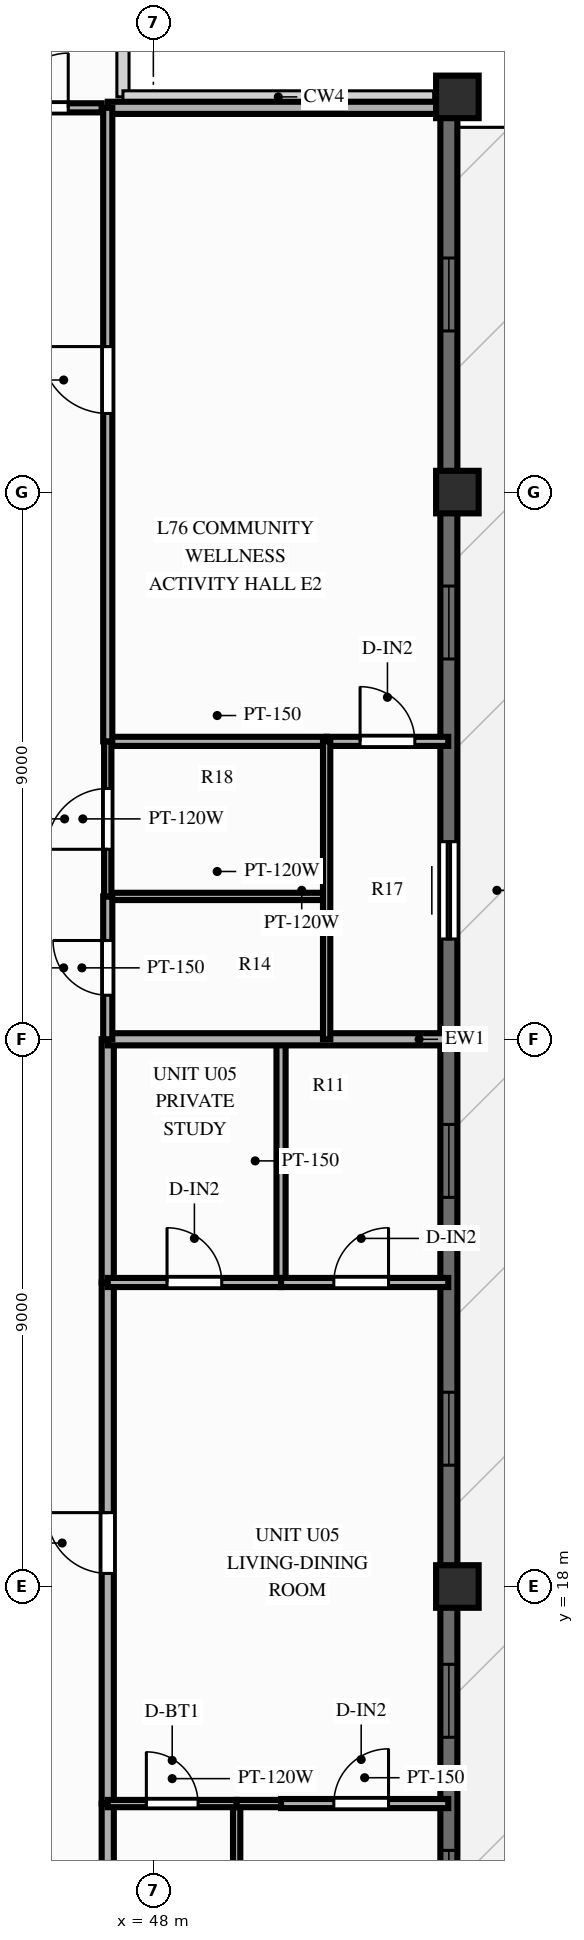
"""IFC4 building model, lengths in metres.
Left out: names, types, materials, properties, quantities, classifications, styles, units other than length and angle.
Written with IfcOpenShell. Run it as: python <this file> out.ifc"""

import sys

from ifc_helpers import new_model, si_unit, direction, frame, frame_2d, origin, origin_2d, place, context, subcontext, project, spatial, rectangle, extrude, source, transform, mapped, element, fill, save


model = new_model("IFC4")
c1 = context("Model", 3, precision=1e-05, world=origin(), true_north=direction((0.0, 1.0)))
c2 = subcontext(c1, "Body", "Model", "MODEL_VIEW")
j1 = project(units=[si_unit("LENGTHUNIT", "METRE"), si_unit("PLANEANGLEUNIT", "RADIAN")], contexts=[c1])
p1 = place(None, origin())
s1 = spatial("IfcSite", under=j1, at=p1, CompositionType="ELEMENT")
p2 = place(p1, origin())
s2 = spatial("IfcBuilding", under=s1, at=p2, CompositionType="ELEMENT")
p3 = place(p2, frame((0.0, 0.0, 246.0)))
s3 = spatial("IfcBuildingStorey", under=s2, at=p3, CompositionType="ELEMENT", Elevation=246.0)
m1 = source(origin(), c2, "Body", "SweptSolid", [
    extrude(rectangle(XDim=0.7, YDim=0.7, at=origin_2d()), origin(), (0.0, 0.0, 1.0), 3.0),
])
for number, where, z_axis, x_axis in (
    (1, (53.0, 18.0, 0.0), (0.0, 0.0, 1.0), (1.0, 0.0, 0.0)),
    (2, (53.0, 36.0, 0.0), (0.0, 0.0, 1.0), (1.0, 0.0, 0.0)),
    (3, (53.0, 42.5, 0.0), (0.0, 0.0, 1.0), (1.0, 0.0, 0.0)),
):
    element("IfcColumn", number, at=place(p3, frame(where, z_axis=z_axis, x_axis=x_axis)), inside=s3, PredefinedType="COLUMN", context=c2, shape_type="MappedRepresentation", body=[
        mapped(m1, transform((0.0, 0.0, 0.0), scale=1.0)),
    ])
p4 = place(p3, frame((52.86, 11.5, 0.0), z_axis=(0.0, 0.0, 1.0), x_axis=(0.0, 1.0, 0.0)))
e4 = element("IfcWall", 4, at=p4, inside=s3, PredefinedType="SOLIDWALL", context=c2, shape_type="SweptSolid", body=[
    extrude(rectangle(XDim=31.0, YDim=0.28, at=frame_2d((15.5, 0.0))), origin(), (0.0, 0.0, 1.0), 2.28),
])
p5 = place(p4, frame((0.96, 0.0, 0.25)))
e5 = element("IfcOpeningElement", 5, at=p5, cuts=e4, PredefinedType="OPENING", context=c2, shape_type="SweptSolid", body=[
    extrude(rectangle(XDim=1.2, YDim=1.5, at=frame_2d((0.6, 0.75))), frame((0.0, 0.152, 0.0), z_axis=(0.0, -1.0, 0.0), x_axis=(1.0, 0.0, 0.0)), (0.0, 0.0, 1.0), 0.304),
])
p6 = place(p4, frame((4.02, 0.0, 0.25)))
e6 = element("IfcOpeningElement", 6, at=p6, cuts=e4, PredefinedType="OPENING", context=c2, shape_type="SweptSolid", body=[
    extrude(rectangle(XDim=1.2, YDim=1.5, at=frame_2d((0.6, 0.75))), frame((0.0, 0.152, 0.0), z_axis=(0.0, -1.0, 0.0), x_axis=(1.0, 0.0, 0.0)), (0.0, 0.0, 1.0), 0.304),
])
p7 = place(p4, frame((8.495, 0.0, 0.25)))
e7 = element("IfcOpeningElement", 7, at=p7, cuts=e4, PredefinedType="OPENING", context=c2, shape_type="SweptSolid", body=[
    extrude(rectangle(XDim=1.2, YDim=1.5, at=frame_2d((0.6, 0.75))), frame((0.0, 0.152, 0.0), z_axis=(0.0, -1.0, 0.0), x_axis=(1.0, 0.0, 0.0)), (0.0, 0.0, 1.0), 0.304),
])
p8 = place(p4, frame((12.9, 0.0, 0.25)))
e8 = element("IfcOpeningElement", 8, at=p8, cuts=e4, PredefinedType="OPENING", context=c2, shape_type="SweptSolid", body=[
    extrude(rectangle(XDim=1.2, YDim=1.5, at=frame_2d((0.6, 0.75))), frame((0.0, 0.152, 0.0), z_axis=(0.0, -1.0, 0.0), x_axis=(1.0, 0.0, 0.0)), (0.0, 0.0, 1.0), 0.304),
])
p9 = place(p4, frame((18.75, 0.0, 0.0), z_axis=(0.0, 0.0, 1.0), x_axis=(-1.0, 0.0, 0.0)))
e9 = element("IfcOpeningElement", 9, at=p9, cuts=e4, PredefinedType="OPENING", context=c2, shape_type="SweptSolid", body=[
    extrude(rectangle(XDim=1.6, YDim=2.15, at=frame_2d((0.8, 1.075))), frame((0.0, 0.152, 0.0), z_axis=(0.0, -1.0, 0.0), x_axis=(1.0, 0.0, 0.0)), (0.0, 0.0, 1.0), 0.304),
])
p10 = place(p4, frame((21.755, 0.0, 0.25)))
e10 = element("IfcOpeningElement", 10, at=p10, cuts=e4, PredefinedType="OPENING", context=c2, shape_type="SweptSolid", body=[
    extrude(rectangle(XDim=1.2, YDim=1.5, at=frame_2d((0.6, 0.75))), frame((0.0, 0.152, 0.0), z_axis=(0.0, -1.0, 0.0), x_axis=(1.0, 0.0, 0.0)), (0.0, 0.0, 1.0), 0.304),
])
p11 = place(p4, frame((27.15, 0.0, 0.25)))
e11 = element("IfcOpeningElement", 11, at=p11, cuts=e4, PredefinedType="OPENING", context=c2, shape_type="SweptSolid", body=[
    extrude(rectangle(XDim=1.2, YDim=1.5, at=frame_2d((0.6, 0.75))), frame((0.0, 0.152, 0.0), z_axis=(0.0, -1.0, 0.0), x_axis=(1.0, 0.0, 0.0)), (0.0, 0.0, 1.0), 0.304),
])
p12 = place(p3, frame((44.82, 42.32, 0.0), z_axis=(0.0, 0.0, 1.0), x_axis=(1.0, 0.0, 0.0)))
e12 = element("IfcWall", 12, at=p12, inside=s3, PredefinedType="PARTITIONING", context=c2, shape_type="SweptSolid", body=[
    extrude(rectangle(XDim=2.33, YDim=0.15, at=frame_2d((1.165, 0.0))), origin(), (0.0, 0.0, 1.0), 2.74),
])
p13 = place(p12, frame((0.88, 0.0, 0.0)))
e13 = element("IfcOpeningElement", 13, at=p13, cuts=e12, PredefinedType="OPENING", context=c2, shape_type="SweptSolid", body=[
    extrude(rectangle(XDim=0.9, YDim=2.1, at=frame_2d((0.45, 1.05))), frame((0.0, 0.087, 0.0), z_axis=(0.0, -1.0, 0.0), x_axis=(1.0, 0.0, 0.0)), (0.0, 0.0, 1.0), 0.174),
])
p14 = place(p3, frame((47.25, 42.32, 0.0), z_axis=(0.0, 0.0, 1.0), x_axis=(1.0, 0.0, 0.0)))
e14 = element("IfcWall", 14, at=p14, inside=s3, PredefinedType="PARTITIONING", context=c2, shape_type="SweptSolid", body=[
    extrude(rectangle(XDim=5.6, YDim=0.2, at=frame_2d((2.8, 0.0))), origin(), (0.0, 0.0, 1.0), 2.74),
])
p15 = place(p3, frame((47.25, 11.68, 0.0), z_axis=(0.0, 0.0, 1.0), x_axis=(0.0, 1.0, 0.0)))
e15 = element("IfcWall", 15, at=p15, inside=s3, PredefinedType="PARTITIONING", context=c2, shape_type="SweptSolid", body=[
    extrude(rectangle(XDim=2.75, YDim=0.2, at=frame_2d((1.375, 0.0))), origin(), (0.0, 0.0, 1.0), 2.74),
])
p16 = place(p3, frame((47.25, 14.43, 0.0), z_axis=(0.0, 0.0, 1.0), x_axis=(0.0, 1.0, 0.0)))
e16 = element("IfcWall", 16, at=p16, inside=s3, PredefinedType="PARTITIONING", context=c2, shape_type="SweptSolid", body=[
    extrude(rectangle(XDim=8.57, YDim=0.2, at=frame_2d((4.285, 0.0))), origin(), (0.0, 0.0, 1.0), 2.74),
])
p17 = place(p16, frame((3.785, 0.0, 0.0)))
e17 = element("IfcOpeningElement", 17, at=p17, cuts=e16, PredefinedType="OPENING", context=c2, shape_type="SweptSolid", body=[
    extrude(rectangle(XDim=1.0, YDim=2.15, at=frame_2d((0.5, 1.075))), frame((0.0, 0.112, 0.0), z_axis=(0.0, -1.0, 0.0), x_axis=(1.0, 0.0, 0.0)), (0.0, 0.0, 1.0), 0.224),
])
p18 = place(p3, frame((47.25, 23.0, 0.0), z_axis=(0.0, 0.0, 1.0), x_axis=(0.0, 1.0, 0.0)))
e18 = element("IfcWall", 18, at=p18, inside=s3, PredefinedType="PARTITIONING", context=c2, shape_type="SweptSolid", body=[
    extrude(rectangle(XDim=4.0, YDim=0.2, at=frame_2d((2.0, 0.0))), origin(), (0.0, 0.0, 1.0), 2.74),
])
p19 = place(p3, frame((49.37, 11.68, 0.0), z_axis=(0.0, 0.0, 1.0), x_axis=(0.0, 1.0, 0.0)))
e19 = element("IfcWall", 19, at=p19, inside=s3, PredefinedType="PARTITIONING", context=c2, shape_type="SweptSolid", body=[
    extrude(rectangle(XDim=2.75, YDim=0.12, at=frame_2d((1.375, 0.0))), origin(), (0.0, 0.0, 1.0), 2.74),
])
p20 = place(p3, frame((50.1, 23.0, 0.0), z_axis=(0.0, 0.0, 1.0), x_axis=(0.0, 1.0, 0.0)))
e20 = element("IfcWall", 20, at=p20, inside=s3, PredefinedType="PARTITIONING", context=c2, shape_type="SweptSolid", body=[
    extrude(rectangle(XDim=4.0, YDim=0.15, at=frame_2d((2.0, 0.0))), origin(), (0.0, 0.0, 1.0), 2.74),
])
p21 = place(p3, frame((47.25, 14.43, 0.0), z_axis=(0.0, 0.0, 1.0), x_axis=(1.0, 0.0, 0.0)))
e21 = element("IfcWall", 21, at=p21, inside=s3, PredefinedType="PARTITIONING", context=c2, shape_type="SweptSolid", body=[
    extrude(rectangle(XDim=2.12, YDim=0.12, at=frame_2d((1.06, 0.0))), origin(), (0.0, 0.0, 1.0), 2.74),
])
p22 = place(p21, frame((0.635, 0.0, 0.0)))
e22 = element("IfcOpeningElement", 22, at=p22, cuts=e21, PredefinedType="OPENING", context=c2, shape_type="SweptSolid", body=[
    extrude(rectangle(XDim=0.85, YDim=2.05, at=frame_2d((0.425, 1.025))), frame((0.0, 0.072, 0.0), z_axis=(0.0, -1.0, 0.0), x_axis=(1.0, 0.0, 0.0)), (0.0, 0.0, 1.0), 0.144),
])
p23 = place(p3, frame((49.37, 14.43, 0.0), z_axis=(0.0, 0.0, 1.0), x_axis=(1.0, 0.0, 0.0)))
e23 = element("IfcWall", 23, at=p23, inside=s3, PredefinedType="PARTITIONING", context=c2, shape_type="SweptSolid", body=[
    extrude(rectangle(XDim=0.73, YDim=0.12, at=frame_2d((0.365, 0.0))), origin(), (0.0, 0.0, 1.0), 2.74),
])
p24 = place(p3, frame((50.1, 14.43, 0.0), z_axis=(0.0, 0.0, 1.0), x_axis=(1.0, 0.0, 0.0)))
e24 = element("IfcWall", 24, at=p24, inside=s3, PredefinedType="PARTITIONING", context=c2, shape_type="SweptSolid", body=[
    extrude(rectangle(XDim=2.75, YDim=0.15, at=frame_2d((1.375, 0.0))), origin(), (0.0, 0.0, 1.0), 2.74),
])
p25 = place(p24, frame((0.868, 0.0, 0.0)))
e25 = element("IfcOpeningElement", 25, at=p25, cuts=e24, PredefinedType="OPENING", context=c2, shape_type="SweptSolid", body=[
    extrude(rectangle(XDim=0.9, YDim=2.1, at=frame_2d((0.45, 1.05))), frame((0.0, 0.087, 0.0), z_axis=(0.0, -1.0, 0.0), x_axis=(1.0, 0.0, 0.0)), (0.0, 0.0, 1.0), 0.174),
])
p26 = place(p3, frame((47.25, 23.0, 0.0), z_axis=(0.0, 0.0, 1.0), x_axis=(1.0, 0.0, 0.0)))
e26 = element("IfcWall", 26, at=p26, inside=s3, PredefinedType="PARTITIONING", context=c2, shape_type="SweptSolid", body=[
    extrude(rectangle(XDim=2.85, YDim=0.15, at=frame_2d((1.425, 0.0))), origin(), (0.0, 0.0, 1.0), 2.74),
])
p27 = place(p26, frame((0.975, 0.0, 0.0)))
e27 = element("IfcOpeningElement", 27, at=p27, cuts=e26, PredefinedType="OPENING", context=c2, shape_type="SweptSolid", body=[
    extrude(rectangle(XDim=0.9, YDim=2.1, at=frame_2d((0.45, 1.05))), frame((0.0, 0.087, 0.0), z_axis=(0.0, -1.0, 0.0), x_axis=(1.0, 0.0, 0.0)), (0.0, 0.0, 1.0), 0.174),
])
p28 = place(p3, frame((50.1, 23.0, 0.0), z_axis=(0.0, 0.0, 1.0), x_axis=(1.0, 0.0, 0.0)))
e28 = element("IfcWall", 28, at=p28, inside=s3, PredefinedType="PARTITIONING", context=c2, shape_type="SweptSolid", body=[
    extrude(rectangle(XDim=2.75, YDim=0.15, at=frame_2d((1.375, 0.0))), origin(), (0.0, 0.0, 1.0), 2.74),
])
p29 = place(p28, frame((0.868, 0.0, 0.0)))
e29 = element("IfcOpeningElement", 29, at=p29, cuts=e28, PredefinedType="OPENING", context=c2, shape_type="SweptSolid", body=[
    extrude(rectangle(XDim=0.9, YDim=2.1, at=frame_2d((0.45, 1.05))), frame((0.0, 0.087, 0.0), z_axis=(0.0, -1.0, 0.0), x_axis=(1.0, 0.0, 0.0)), (0.0, 0.0, 1.0), 0.174),
])
p30 = place(p3, frame((47.25, 27.0, 0.0), z_axis=(0.0, 0.0, 1.0), x_axis=(1.0, 0.0, 0.0)))
e30 = element("IfcWall", 30, at=p30, inside=s3, PredefinedType="PARTITIONING", context=c2, shape_type="SweptSolid", body=[
    extrude(rectangle(XDim=5.6, YDim=0.2, at=frame_2d((2.8, 0.0))), origin(), (0.0, 0.0, 1.0), 2.74),
])
p31 = place(p3, frame((47.25, 29.35, 0.0), z_axis=(0.0, 0.0, 1.0), x_axis=(1.0, 0.0, 0.0)))
e31 = element("IfcWall", 31, at=p31, inside=s3, PredefinedType="PARTITIONING", context=c2, shape_type="SweptSolid", body=[
    extrude(rectangle(XDim=3.6, YDim=0.12, at=frame_2d((1.8, 0.0))), origin(), (0.0, 0.0, 1.0), 2.74),
])
p32 = place(p3, frame((47.25, 31.9, 0.0), z_axis=(0.0, 0.0, 1.0), x_axis=(1.0, 0.0, 0.0)))
e32 = element("IfcWall", 32, at=p32, inside=s3, PredefinedType="PARTITIONING", context=c2, shape_type="SweptSolid", body=[
    extrude(rectangle(XDim=3.6, YDim=0.15, at=frame_2d((1.8, 0.0))), origin(), (0.0, 0.0, 1.0), 2.39),
])
p33 = place(p3, frame((50.85, 31.9, 0.0), z_axis=(0.0, 0.0, 1.0), x_axis=(1.0, 0.0, 0.0)))
e33 = element("IfcWall", 33, at=p33, inside=s3, PredefinedType="PARTITIONING", context=c2, shape_type="SweptSolid", body=[
    extrude(rectangle(XDim=2.0, YDim=0.15, at=frame_2d((1.0, 0.0))), origin(), (0.0, 0.0, 1.0), 2.39),
])
p34 = place(p33, frame((0.55, 0.0, 0.0)))
e34 = element("IfcOpeningElement", 34, at=p34, cuts=e33, PredefinedType="OPENING", context=c2, shape_type="SweptSolid", body=[
    extrude(rectangle(XDim=0.9, YDim=2.1, at=frame_2d((0.45, 1.05))), frame((0.0, 0.087, 0.0), z_axis=(0.0, -1.0, 0.0), x_axis=(1.0, 0.0, 0.0)), (0.0, 0.0, 1.0), 0.174),
])
p35 = place(p3, frame((50.85, 27.0, 0.0), z_axis=(0.0, 0.0, 1.0), x_axis=(0.0, 1.0, 0.0)))
e35 = element("IfcWall", 35, at=p35, inside=s3, PredefinedType="PARTITIONING", context=c2, shape_type="SweptSolid", body=[
    extrude(rectangle(XDim=4.9, YDim=0.12, at=frame_2d((2.45, 0.0))), origin(), (0.0, 0.0, 1.0), 2.74),
])
p36 = place(p3, frame((47.25, 27.0, 0.0), z_axis=(0.0, 0.0, 1.0), x_axis=(0.0, 1.0, 0.0)))
e36 = element("IfcWall", 36, at=p36, inside=s3, PredefinedType="PARTITIONING", context=c2, shape_type="SweptSolid", body=[
    extrude(rectangle(XDim=2.35, YDim=0.15, at=frame_2d((1.175, 0.0))), origin(), (0.0, 0.0, 1.0), 2.74),
])
p37 = place(p36, frame((0.725, 0.0, 0.0)))
e37 = element("IfcOpeningElement", 37, at=p37, cuts=e36, PredefinedType="OPENING", context=c2, shape_type="SweptSolid", body=[
    extrude(rectangle(XDim=0.9, YDim=2.1, at=frame_2d((0.45, 1.05))), frame((0.0, 0.087, 0.0), z_axis=(0.0, -1.0, 0.0), x_axis=(1.0, 0.0, 0.0)), (0.0, 0.0, 1.0), 0.174),
])
p38 = place(p3, frame((47.25, 29.35, 0.0), z_axis=(0.0, 0.0, 1.0), x_axis=(0.0, 1.0, 0.0)))
e38 = element("IfcWall", 38, at=p38, inside=s3, PredefinedType="PARTITIONING", context=c2, shape_type="SweptSolid", body=[
    extrude(rectangle(XDim=2.55, YDim=0.12, at=frame_2d((1.275, 0.0))), origin(), (0.0, 0.0, 1.0), 2.74),
])
p39 = place(p38, frame((0.775, 0.0, 0.0)))
e39 = element("IfcOpeningElement", 39, at=p39, cuts=e38, PredefinedType="OPENING", context=c2, shape_type="SweptSolid", body=[
    extrude(rectangle(XDim=1.0, YDim=2.1, at=frame_2d((0.5, 1.05))), frame((0.0, 0.072, 0.0), z_axis=(0.0, -1.0, 0.0), x_axis=(1.0, 0.0, 0.0)), (0.0, 0.0, 1.0), 0.144),
])
p40 = place(p3, frame((47.25, 31.9, 0.0), z_axis=(0.0, 0.0, 1.0), x_axis=(0.0, 1.0, 0.0)))
e40 = element("IfcWall", 40, at=p40, inside=s3, PredefinedType="PARTITIONING", context=c2, shape_type="SweptSolid", body=[
    extrude(rectangle(XDim=10.42, YDim=0.15, at=frame_2d((5.21, 0.0))), origin(), (0.0, 0.0, 1.0), 2.74),
])
p41 = place(p40, frame((5.393, 0.0, 0.0)))
e41 = element("IfcOpeningElement", 41, at=p41, cuts=e40, PredefinedType="OPENING", context=c2, shape_type="SweptSolid", body=[
    extrude(rectangle(XDim=1.1, YDim=2.15, at=frame_2d((0.55, 1.075))), frame((0.0, 0.087, 0.0), z_axis=(0.0, -1.0, 0.0), x_axis=(1.0, 0.0, 0.0)), (0.0, 0.0, 1.0), 0.174),
])
m2 = source(origin(), c2, "Body", "SweptSolid", [
    extrude(rectangle(XDim=1.2, YDim=1.5, at=frame_2d((0.6, 0.75))), frame((0.0, 0.03, 0.0), z_axis=(0.0, -1.0, 0.0), x_axis=(1.0, 0.0, 0.0)), (0.0, 0.0, 1.0), 0.06),
])
p42 = place(p5, origin())
e42 = element("IfcWindow", 42, at=p42, inside=s3, PartitioningType="SINGLE_PANEL", PredefinedType="WINDOW", context=c2, shape_type="MappedRepresentation", body=[
    mapped(m2, transform((0.0, 0.0, 0.0), scale=1.0)),
])
fill(e5, e42)
p43 = place(p6, origin())
e43 = element("IfcWindow", 43, at=p43, inside=s3, PartitioningType="SINGLE_PANEL", PredefinedType="WINDOW", context=c2, shape_type="MappedRepresentation", body=[
    mapped(m2, transform((0.0, 0.0, 0.0), scale=1.0)),
])
fill(e6, e43)
p44 = place(p7, origin())
e44 = element("IfcWindow", 44, at=p44, inside=s3, PartitioningType="SINGLE_PANEL", PredefinedType="WINDOW", context=c2, shape_type="MappedRepresentation", body=[
    mapped(m2, transform((0.0, 0.0, 0.0), scale=1.0)),
])
fill(e7, e44)
p45 = place(p8, origin())
e45 = element("IfcWindow", 45, at=p45, inside=s3, PartitioningType="SINGLE_PANEL", PredefinedType="WINDOW", context=c2, shape_type="MappedRepresentation", body=[
    mapped(m2, transform((0.0, 0.0, 0.0), scale=1.0)),
])
fill(e8, e45)
m3 = source(origin(), c2, "Body", "SweptSolid", [
    extrude(rectangle(XDim=1.6, YDim=2.15, at=frame_2d((0.8, 1.075))), frame((0.0, 0.025, 0.0), z_axis=(0.0, -1.0, 0.0), x_axis=(1.0, 0.0, 0.0)), (0.0, 0.0, 1.0), 0.05),
])
p46 = place(p9, origin())
e46 = element("IfcDoor", 46, at=p46, inside=s3, OperationType="SLIDING_TO_LEFT", PredefinedType="DOOR", context=c2, shape_type="MappedRepresentation", body=[
    mapped(m3, transform((0.0, 0.0, 0.0), scale=1.0)),
])
fill(e9, e46)
p47 = place(p10, origin())
e47 = element("IfcWindow", 47, at=p47, inside=s3, PartitioningType="SINGLE_PANEL", PredefinedType="WINDOW", context=c2, shape_type="MappedRepresentation", body=[
    mapped(m2, transform((0.0, 0.0, 0.0), scale=1.0)),
])
fill(e10, e47)
p48 = place(p11, origin())
e48 = element("IfcWindow", 48, at=p48, inside=s3, PartitioningType="SINGLE_PANEL", PredefinedType="WINDOW", context=c2, shape_type="MappedRepresentation", body=[
    mapped(m2, transform((0.0, 0.0, 0.0), scale=1.0)),
])
fill(e11, e48)
m4 = source(origin(), c2, "Body", "SweptSolid", [
    extrude(rectangle(XDim=0.9, YDim=2.1, at=frame_2d((0.45, 1.05))), frame((0.0, 0.025, 0.0), z_axis=(0.0, -1.0, 0.0), x_axis=(1.0, 0.0, 0.0)), (0.0, 0.0, 1.0), 0.05),
])
p49 = place(p13, origin())
e49 = element("IfcDoor", 49, at=p49, inside=s3, OperationType="SINGLE_SWING_RIGHT", PredefinedType="DOOR", context=c2, shape_type="MappedRepresentation", body=[
    mapped(m4, transform((0.0, 0.0, 0.0), scale=1.0)),
])
fill(e13, e49)
m5 = source(origin(), c2, "Body", "SweptSolid", [
    extrude(rectangle(XDim=1.0, YDim=2.15, at=frame_2d((0.5, 1.075))), frame((0.0, 0.025, 0.0), z_axis=(0.0, -1.0, 0.0), x_axis=(1.0, 0.0, 0.0)), (0.0, 0.0, 1.0), 0.05),
])
p50 = place(p17, origin())
e50 = element("IfcDoor", 50, at=p50, inside=s3, OperationType="SINGLE_SWING_RIGHT", PredefinedType="DOOR", context=c2, shape_type="MappedRepresentation", body=[
    mapped(m5, transform((0.0, 0.0, 0.0), scale=1.0)),
])
fill(e17, e50)
m6 = source(origin(), c2, "Body", "SweptSolid", [
    extrude(rectangle(XDim=0.85, YDim=2.05, at=frame_2d((0.425, 1.025))), frame((0.0, 0.025, 0.0), z_axis=(0.0, -1.0, 0.0), x_axis=(1.0, 0.0, 0.0)), (0.0, 0.0, 1.0), 0.05),
])
p51 = place(p22, origin())
e51 = element("IfcDoor", 51, at=p51, inside=s3, OperationType="SINGLE_SWING_LEFT", PredefinedType="DOOR", context=c2, shape_type="MappedRepresentation", body=[
    mapped(m6, transform((0.0, 0.0, 0.0), scale=1.0)),
])
fill(e22, e51)
p52 = place(p25, origin())
e52 = element("IfcDoor", 52, at=p52, inside=s3, OperationType="SINGLE_SWING_RIGHT", PredefinedType="DOOR", context=c2, shape_type="MappedRepresentation", body=[
    mapped(m4, transform((0.0, 0.0, 0.0), scale=1.0)),
])
fill(e25, e52)
p53 = place(p27, origin())
e53 = element("IfcDoor", 53, at=p53, inside=s3, OperationType="SINGLE_SWING_LEFT", PredefinedType="DOOR", context=c2, shape_type="MappedRepresentation", body=[
    mapped(m4, transform((0.0, 0.0, 0.0), scale=1.0)),
])
fill(e27, e53)
p54 = place(p29, origin())
e54 = element("IfcDoor", 54, at=p54, inside=s3, OperationType="SINGLE_SWING_RIGHT", PredefinedType="DOOR", context=c2, shape_type="MappedRepresentation", body=[
    mapped(m4, transform((0.0, 0.0, 0.0), scale=1.0)),
])
fill(e29, e54)
p55 = place(p34, origin())
e55 = element("IfcDoor", 55, at=p55, inside=s3, OperationType="SINGLE_SWING_LEFT", PredefinedType="DOOR", context=c2, shape_type="MappedRepresentation", body=[
    mapped(m4, transform((0.0, 0.0, 0.0), scale=1.0)),
])
fill(e34, e55)
p56 = place(p37, origin())
e56 = element("IfcDoor", 56, at=p56, inside=s3, OperationType="SINGLE_SWING_RIGHT", PredefinedType="DOOR", context=c2, shape_type="MappedRepresentation", body=[
    mapped(m4, transform((0.0, 0.0, 0.0), scale=1.0)),
])
fill(e37, e56)
m7 = source(origin(), c2, "Body", "SweptSolid", [
    extrude(rectangle(XDim=1.0, YDim=2.1, at=frame_2d((0.5, 1.05))), frame((0.0, 0.025, 0.0), z_axis=(0.0, -1.0, 0.0), x_axis=(1.0, 0.0, 0.0)), (0.0, 0.0, 1.0), 0.05),
])
p57 = place(p39, origin())
e57 = element("IfcDoor", 57, at=p57, inside=s3, OperationType="SINGLE_SWING_LEFT", PredefinedType="DOOR", context=c2, shape_type="MappedRepresentation", body=[
    mapped(m7, transform((0.0, 0.0, 0.0), scale=1.0)),
])
fill(e39, e57)
m8 = source(origin(), c2, "Body", "SweptSolid", [
    extrude(rectangle(XDim=1.1, YDim=2.15, at=frame_2d((0.55, 1.075))), frame((0.0, 0.025, 0.0), z_axis=(0.0, -1.0, 0.0), x_axis=(1.0, 0.0, 0.0)), (0.0, 0.0, 1.0), 0.05),
])
p58 = place(p41, origin())
e58 = element("IfcDoor", 58, at=p58, inside=s3, OperationType="SINGLE_SWING_RIGHT", PredefinedType="DOOR", context=c2, shape_type="MappedRepresentation", body=[
    mapped(m8, transform((0.0, 0.0, 0.0), scale=1.0)),
])
fill(e41, e58)
save(model, sys.argv[1])
